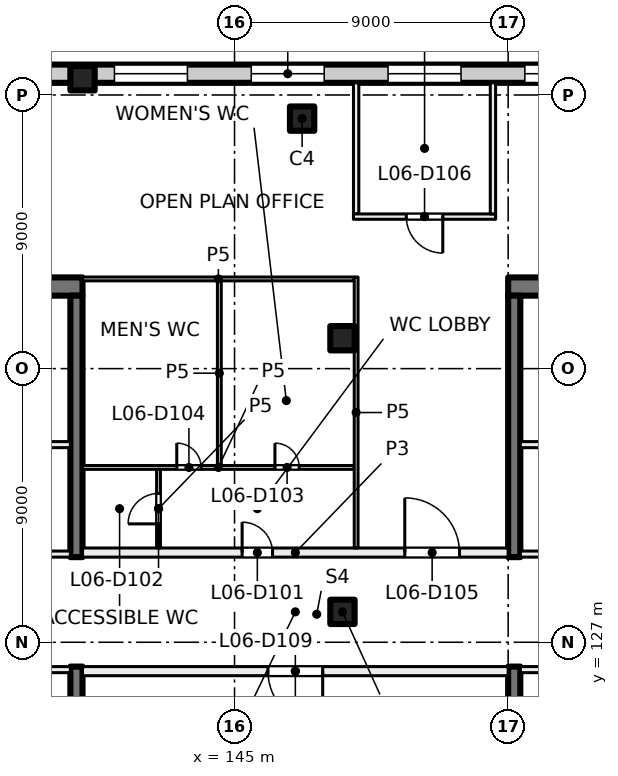
"""IFC4 building model, lengths in metres.
Left out: names, types, materials, properties, quantities, classifications, styles, units other than length and angle.
Written with IfcOpenShell. Run it as: python <this file> out.ifc"""

import sys

from ifc_helpers import new_model, si_unit, direction, frame, frame_2d, origin, origin_2d, place, context, subcontext, project, spatial, rectangle, extrude, element, fill, save


model = new_model("IFC4")
c1 = context("Model", 3, precision=1e-05, world=origin(), true_north=direction((0.0, 1.0)))
c2 = subcontext(c1, "Body", "Model", "MODEL_VIEW")
j1 = project(units=[si_unit("LENGTHUNIT", "METRE"), si_unit("PLANEANGLEUNIT", "RADIAN")], contexts=[c1])
p1 = place(None, origin())
s1 = spatial("IfcSite", under=j1, at=p1, CompositionType="ELEMENT")
p2 = place(p1, origin())
s2 = spatial("IfcBuilding", under=s1, at=p2, CompositionType="ELEMENT")
p3 = place(p2, frame((0.0, 0.0, 31.5)))
s3 = spatial("IfcBuildingStorey", under=s2, at=p3, CompositionType="ELEMENT", Elevation=31.5)
for number, where, z_axis, x_axis in (
    (1, (148.55, 128.0, 0.0), (0.0, 0.0, 1.0), (1.0, 0.0, 0.0)),
    (2, (148.55, 137.0, 0.0), (0.0, 0.0, 1.0), (1.0, 0.0, 0.0)),
    (3, (140.0, 145.55, 0.0), (0.0, 0.0, 1.0), (1.0, 0.0, 0.0)),
    (4, (147.223, 144.223, 0.0), (0.0, 0.0, 1.0), (1.0, 0.0, 0.0)),
):
    element("IfcColumn", number, at=place(p3, frame(where, z_axis=z_axis, x_axis=x_axis)), inside=s3, PredefinedType="COLUMN", context=c2, shape_type="SweptSolid", body=[
        extrude(rectangle(XDim=0.8, YDim=0.8, at=origin_2d()), origin(), (0.0, 0.0, 1.0), 4.0),
    ])
p4 = place(p3, frame((135.4, 138.7, 0.0), z_axis=(0.0, 0.0, 1.0), x_axis=(1.0, 0.0, 0.0)))
e5 = element("IfcWall", 5, at=p4, inside=s3, PredefinedType="SHEAR", context=c2, shape_type="SweptSolid", body=[
    extrude(rectangle(XDim=4.6, YDim=0.6, at=frame_2d((2.3, 0.0))), origin(), (0.0, 0.0, 1.0), 4.0),
])
for number, where, z_axis, x_axis in (
    (6, (139.8, 117.6, 0.0), (0.0, 0.0, 1.0), (0.0, 1.0, 0.0)),
    (7, (139.8, 129.8, 0.0), (0.0, 0.0, 1.0), (0.0, 1.0, 0.0)),
):
    element("IfcWall", number, at=place(p3, frame(where, z_axis=z_axis, x_axis=x_axis)), inside=s3, PredefinedType="SHEAR", context=c2, shape_type="SweptSolid", body=[
        extrude(rectangle(XDim=8.6, YDim=0.4, at=frame_2d((4.3, 0.0))), origin(), (0.0, 0.0, 1.0), 4.0),
    ])
p5 = place(p3, frame((158.6, 138.7, 0.0), z_axis=(0.0, 0.0, 1.0), x_axis=(-1.0, 0.0, 0.0)))
e8 = element("IfcWall", 8, at=p5, inside=s3, PredefinedType="SHEAR", context=c2, shape_type="SweptSolid", body=[
    extrude(rectangle(XDim=4.6, YDim=0.6, at=frame_2d((2.3, 0.0))), origin(), (0.0, 0.0, 1.0), 4.0),
])
for number, where, z_axis, x_axis in (
    (9, (154.2, 138.4, 0.0), (0.0, 0.0, 1.0), (0.0, -1.0, 0.0)),
    (10, (154.2, 126.2, 0.0), (0.0, 0.0, 1.0), (0.0, -1.0, 0.0)),
):
    element("IfcWall", number, at=place(p3, frame(where, z_axis=z_axis, x_axis=x_axis)), inside=s3, PredefinedType="SHEAR", context=c2, shape_type="SweptSolid", body=[
        extrude(rectangle(XDim=8.6, YDim=0.4, at=frame_2d((4.3, 0.0))), origin(), (0.0, 0.0, 1.0), 4.0),
    ])
p6 = place(p3, frame((131.07, 145.7, 0.0), z_axis=(0.0, 0.0, 1.0), x_axis=(1.0, 0.0, 0.0)))
e11 = element("IfcWall", 11, at=p6, inside=s3, PredefinedType="SOLIDWALL", context=c2, shape_type="SweptSolid", body=[
    extrude(rectangle(XDim=31.93, YDim=0.6, at=frame_2d((15.965, 0.0))), origin(), (0.0, 0.0, 1.0), 3.625),
])
p7 = place(p6, frame((0.98, 0.0, 0.9)))
e12 = element("IfcOpeningElement", 12, at=p7, cuts=e11, PredefinedType="OPENING", context=c2, shape_type="SweptSolid", body=[
    extrude(rectangle(XDim=2.4, YDim=2.4, at=frame_2d((1.2, 1.2))), frame((0.0, 0.31, 0.0), z_axis=(0.0, -1.0, 0.0), x_axis=(1.0, 0.0, 0.0)), (0.0, 0.0, 1.0), 0.62),
])
p8 = place(p6, frame((5.48, 0.0, 0.9)))
e13 = element("IfcOpeningElement", 13, at=p8, cuts=e11, PredefinedType="OPENING", context=c2, shape_type="SweptSolid", body=[
    extrude(rectangle(XDim=2.4, YDim=2.4, at=frame_2d((1.2, 1.2))), frame((0.0, 0.31, 0.0), z_axis=(0.0, -1.0, 0.0), x_axis=(1.0, 0.0, 0.0)), (0.0, 0.0, 1.0), 0.62),
])
p9 = place(p6, frame((9.98, 0.0, 0.9)))
e14 = element("IfcOpeningElement", 14, at=p9, cuts=e11, PredefinedType="OPENING", context=c2, shape_type="SweptSolid", body=[
    extrude(rectangle(XDim=2.4, YDim=2.4, at=frame_2d((1.2, 1.2))), frame((0.0, 0.31, 0.0), z_axis=(0.0, -1.0, 0.0), x_axis=(1.0, 0.0, 0.0)), (0.0, 0.0, 1.0), 0.62),
])
p10 = place(p6, frame((14.48, 0.0, 0.9)))
e15 = element("IfcOpeningElement", 15, at=p10, cuts=e11, PredefinedType="OPENING", context=c2, shape_type="SweptSolid", body=[
    extrude(rectangle(XDim=2.4, YDim=2.4, at=frame_2d((1.2, 1.2))), frame((0.0, 0.31, 0.0), z_axis=(0.0, -1.0, 0.0), x_axis=(1.0, 0.0, 0.0)), (0.0, 0.0, 1.0), 0.62),
])
p11 = place(p6, frame((18.98, 0.0, 0.9)))
e16 = element("IfcOpeningElement", 16, at=p11, cuts=e11, PredefinedType="OPENING", context=c2, shape_type="SweptSolid", body=[
    extrude(rectangle(XDim=2.4, YDim=2.4, at=frame_2d((1.2, 1.2))), frame((0.0, 0.31, 0.0), z_axis=(0.0, -1.0, 0.0), x_axis=(1.0, 0.0, 0.0)), (0.0, 0.0, 1.0), 0.62),
])
p12 = place(p6, frame((23.48, 0.0, 0.9)))
e17 = element("IfcOpeningElement", 17, at=p12, cuts=e11, PredefinedType="OPENING", context=c2, shape_type="SweptSolid", body=[
    extrude(rectangle(XDim=2.4, YDim=2.4, at=frame_2d((1.2, 1.2))), frame((0.0, 0.31, 0.0), z_axis=(0.0, -1.0, 0.0), x_axis=(1.0, 0.0, 0.0)), (0.0, 0.0, 1.0), 0.62),
])
p13 = place(p6, frame((27.98, 0.0, 0.9)))
e18 = element("IfcOpeningElement", 18, at=p13, cuts=e11, PredefinedType="OPENING", context=c2, shape_type="SweptSolid", body=[
    extrude(rectangle(XDim=2.4, YDim=2.4, at=frame_2d((1.2, 1.2))), frame((0.0, 0.31, 0.0), z_axis=(0.0, -1.0, 0.0), x_axis=(1.0, 0.0, 0.0)), (0.0, 0.0, 1.0), 0.62),
])
p14 = place(p3, frame((135.0, 129.9, 0.0), z_axis=(0.0, 0.0, 1.0), x_axis=(1.0, 0.0, 0.0)))
e19 = element("IfcWall", 19, at=p14, inside=s3, PredefinedType="PARTITIONING", context=c2, shape_type="SweptSolid", body=[
    extrude(rectangle(XDim=4.6, YDim=0.2, at=frame_2d((2.3, 0.0))), origin(), (0.0, 0.0, 1.0), 3.625),
])
p15 = place(p14, frame((1.7, 0.0, 0.0)))
e20 = element("IfcOpeningElement", 20, at=p15, cuts=e19, PredefinedType="OPENING", context=c2, shape_type="SweptSolid", body=[
    extrude(rectangle(XDim=1.2, YDim=2.1, at=frame_2d((0.6, 1.05))), frame((0.0, 0.11, 0.0), z_axis=(0.0, -1.0, 0.0), x_axis=(1.0, 0.0, 0.0)), (0.0, 0.0, 1.0), 0.22),
])
p16 = place(p3, frame((135.0, 133.5, 0.0), z_axis=(0.0, 0.0, 1.0), x_axis=(1.0, 0.0, 0.0)))
e21 = element("IfcWall", 21, at=p16, inside=s3, PredefinedType="PARTITIONING", context=c2, shape_type="SweptSolid", body=[
    extrude(rectangle(XDim=4.6, YDim=0.2, at=frame_2d((2.3, 0.0))), origin(), (0.0, 0.0, 1.0), 3.625),
])
p17 = place(p16, frame((1.75, 0.0, 0.0)))
e22 = element("IfcOpeningElement", 22, at=p17, cuts=e21, PredefinedType="OPENING", context=c2, shape_type="SweptSolid", body=[
    extrude(rectangle(XDim=1.5, YDim=2.1, at=frame_2d((0.75, 1.05))), frame((0.0, 0.11, 0.0), z_axis=(0.0, -1.0, 0.0), x_axis=(1.0, 0.0, 0.0)), (0.0, 0.0, 1.0), 0.22),
])
p18 = place(p3, frame((139.6, 126.1, 0.0), z_axis=(0.0, 0.0, 1.0), x_axis=(-1.0, 0.0, 0.0)))
e23 = element("IfcWall", 23, at=p18, inside=s3, PredefinedType="PARTITIONING", context=c2, shape_type="SweptSolid", body=[
    extrude(rectangle(XDim=4.6, YDim=0.2, at=frame_2d((2.3, 0.0))), origin(), (0.0, 0.0, 1.0), 3.625),
])
p19 = place(p18, frame((1.7, 0.0, 0.0)))
e24 = element("IfcOpeningElement", 24, at=p19, cuts=e23, PredefinedType="OPENING", context=c2, shape_type="SweptSolid", body=[
    extrude(rectangle(XDim=1.2, YDim=2.1, at=frame_2d((0.6, 1.05))), frame((0.0, 0.11, 0.0), z_axis=(0.0, -1.0, 0.0), x_axis=(1.0, 0.0, 0.0)), (0.0, 0.0, 1.0), 0.22),
])
p20 = place(p3, frame((163.8, 126.1, 0.0), z_axis=(0.0, 0.0, 1.0), x_axis=(-1.0, 0.0, 0.0)))
e25 = element("IfcWall", 25, at=p20, inside=s3, PredefinedType="PARTITIONING", context=c2, shape_type="SweptSolid", body=[
    extrude(rectangle(XDim=9.4, YDim=0.2, at=frame_2d((4.7, 0.0))), origin(), (0.0, 0.0, 1.0), 3.625),
])
p21 = place(p20, frame((4.1, 0.0, 0.0)))
e26 = element("IfcOpeningElement", 26, at=p21, cuts=e25, PredefinedType="OPENING", context=c2, shape_type="SweptSolid", body=[
    extrude(rectangle(XDim=1.2, YDim=2.1, at=frame_2d((0.6, 1.05))), frame((0.0, 0.11, 0.0), z_axis=(0.0, -1.0, 0.0), x_axis=(1.0, 0.0, 0.0)), (0.0, 0.0, 1.0), 0.22),
])
p22 = place(p3, frame((154.4, 129.9, 0.0), z_axis=(0.0, 0.0, 1.0), x_axis=(1.0, 0.0, 0.0)))
e27 = element("IfcWall", 27, at=p22, inside=s3, PredefinedType="PARTITIONING", context=c2, shape_type="SweptSolid", body=[
    extrude(rectangle(XDim=9.4, YDim=0.2, at=frame_2d((4.7, 0.0))), origin(), (0.0, 0.0, 1.0), 3.625),
])
p23 = place(p22, frame((4.1, 0.0, 0.0)))
e28 = element("IfcOpeningElement", 28, at=p23, cuts=e27, PredefinedType="OPENING", context=c2, shape_type="SweptSolid", body=[
    extrude(rectangle(XDim=1.2, YDim=2.1, at=frame_2d((0.6, 1.05))), frame((0.0, 0.11, 0.0), z_axis=(0.0, -1.0, 0.0), x_axis=(1.0, 0.0, 0.0)), (0.0, 0.0, 1.0), 0.22),
])
p24 = place(p3, frame((154.4, 133.5, 0.0), z_axis=(0.0, 0.0, 1.0), x_axis=(1.0, 0.0, 0.0)))
e29 = element("IfcWall", 29, at=p24, inside=s3, PredefinedType="PARTITIONING", context=c2, shape_type="SweptSolid", body=[
    extrude(rectangle(XDim=9.4, YDim=0.2, at=frame_2d((4.7, 0.0))), origin(), (0.0, 0.0, 1.0), 3.625),
])
p25 = place(p24, frame((1.35, 0.0, 0.0)))
e30 = element("IfcOpeningElement", 30, at=p25, cuts=e29, PredefinedType="OPENING", context=c2, shape_type="SweptSolid", body=[
    extrude(rectangle(XDim=1.5, YDim=2.1, at=frame_2d((0.75, 1.05))), frame((0.0, 0.11, 0.0), z_axis=(0.0, -1.0, 0.0), x_axis=(1.0, 0.0, 0.0)), (0.0, 0.0, 1.0), 0.22),
])
p26 = place(p3, frame((140.0, 129.95, 0.0), z_axis=(0.0, 0.0, 1.0), x_axis=(1.0, 0.0, 0.0)))
e31 = element("IfcWall", 31, at=p26, inside=s3, PredefinedType="PARTITIONING", context=c2, shape_type="SweptSolid", body=[
    extrude(rectangle(XDim=14.0, YDim=0.3, at=frame_2d((7.0, 0.0))), origin(), (0.0, 0.0, 1.0), 3.625),
])
p27 = place(p26, frame((5.25, 0.0, 0.0)))
e32 = element("IfcOpeningElement", 32, at=p27, cuts=e31, PredefinedType="OPENING", context=c2, shape_type="SweptSolid", body=[
    extrude(rectangle(XDim=1.0, YDim=2.1, at=frame_2d((0.5, 1.05))), frame((0.0, 0.16, 0.0), z_axis=(0.0, -1.0, 0.0), x_axis=(1.0, 0.0, 0.0)), (0.0, 0.0, 1.0), 0.32),
])
p28 = place(p26, frame((10.6, 0.0, 0.0)))
e33 = element("IfcOpeningElement", 33, at=p28, cuts=e31, PredefinedType="OPENING", context=c2, shape_type="SweptSolid", body=[
    extrude(rectangle(XDim=1.8, YDim=2.1, at=frame_2d((0.9, 1.05))), frame((0.0, 0.16, 0.0), z_axis=(0.0, -1.0, 0.0), x_axis=(1.0, 0.0, 0.0)), (0.0, 0.0, 1.0), 0.32),
])
p29 = place(p3, frame((140.0, 132.75, 0.0), z_axis=(0.0, 0.0, 1.0), x_axis=(1.0, 0.0, 0.0)))
e34 = element("IfcWall", 34, at=p29, inside=s3, PredefinedType="PARTITIONING", context=c2, shape_type="SweptSolid", body=[
    extrude(rectangle(XDim=8.938, YDim=0.125, at=frame_2d((4.469, 0.0))), origin(), (0.0, 0.0, 1.0), 3.625),
])
p30 = place(p29, frame((6.329, 0.0, 0.0)))
e35 = element("IfcOpeningElement", 35, at=p30, cuts=e34, PredefinedType="OPENING", context=c2, shape_type="SweptSolid", body=[
    extrude(rectangle(XDim=0.8, YDim=2.1, at=frame_2d((0.4, 1.05))), frame((0.0, 0.073, 0.0), z_axis=(0.0, -1.0, 0.0), x_axis=(1.0, 0.0, 0.0)), (0.0, 0.0, 1.0), 0.145),
])
p31 = place(p29, frame((3.1, 0.0, 0.0)))
e36 = element("IfcOpeningElement", 36, at=p31, cuts=e34, PredefinedType="OPENING", context=c2, shape_type="SweptSolid", body=[
    extrude(rectangle(XDim=0.8, YDim=2.1, at=frame_2d((0.4, 1.05))), frame((0.0, 0.073, 0.0), z_axis=(0.0, -1.0, 0.0), x_axis=(1.0, 0.0, 0.0)), (0.0, 0.0, 1.0), 0.145),
])
p32 = place(p3, frame((140.0, 138.95, 0.0), z_axis=(0.0, 0.0, 1.0), x_axis=(1.0, 0.0, 0.0)))
e37 = element("IfcWall", 37, at=p32, inside=s3, PredefinedType="PARTITIONING", context=c2, shape_type="SweptSolid", body=[
    extrude(rectangle(XDim=8.938, YDim=0.125, at=frame_2d((4.469, 0.0))), origin(), (0.0, 0.0, 1.0), 3.625),
])
p33 = place(p3, frame((142.5, 130.1, 0.0), z_axis=(0.0, 0.0, 1.0), x_axis=(0.0, 1.0, 0.0)))
e38 = element("IfcWall", 38, at=p33, inside=s3, PredefinedType="PARTITIONING", context=c2, shape_type="SweptSolid", body=[
    extrude(rectangle(XDim=2.588, YDim=0.125, at=frame_2d((1.294, 0.0))), origin(), (0.0, 0.0, 1.0), 3.625),
])
p34 = place(p33, frame((0.794, 0.0, 0.0)))
e39 = element("IfcOpeningElement", 39, at=p34, cuts=e38, PredefinedType="OPENING", context=c2, shape_type="SweptSolid", body=[
    extrude(rectangle(XDim=1.0, YDim=2.1, at=frame_2d((0.5, 1.05))), frame((0.0, 0.073, 0.0), z_axis=(0.0, -1.0, 0.0), x_axis=(1.0, 0.0, 0.0)), (0.0, 0.0, 1.0), 0.145),
])
p35 = place(p3, frame((144.5, 138.888, 0.0), z_axis=(0.0, 0.0, 1.0), x_axis=(0.0, -1.0, 0.0)))
e40 = element("IfcWall", 40, at=p35, inside=s3, PredefinedType="PARTITIONING", context=c2, shape_type="SweptSolid", body=[
    extrude(rectangle(XDim=6.076, YDim=0.125, at=frame_2d((3.038, 0.0))), origin(), (0.0, 0.0, 1.0), 3.625),
])
p36 = place(p3, frame((149.0, 139.012, 0.0), z_axis=(0.0, 0.0, 1.0), x_axis=(0.0, -1.0, 0.0)))
e41 = element("IfcWall", 41, at=p36, inside=s3, PredefinedType="PARTITIONING", context=c2, shape_type="SweptSolid", body=[
    extrude(rectangle(XDim=8.912, YDim=0.125, at=frame_2d((4.456, 0.0))), origin(), (0.0, 0.0, 1.0), 3.625),
])
p37 = place(p3, frame((149.0, 141.088, 0.0), z_axis=(0.0, 0.0, 1.0), x_axis=(0.0, 1.0, 0.0)))
e42 = element("IfcWall", 42, at=p37, inside=s3, PredefinedType="PARTITIONING", context=c2, shape_type="SweptSolid", body=[
    extrude(rectangle(XDim=4.312, YDim=0.175, at=frame_2d((2.156, 0.0))), origin(), (0.0, 0.0, 1.0), 3.625),
])
p38 = place(p3, frame((153.588, 141.0, 0.0), z_axis=(0.0, 0.0, 1.0), x_axis=(-1.0, 0.0, 0.0)))
e43 = element("IfcWall", 43, at=p38, inside=s3, PredefinedType="PARTITIONING", context=c2, shape_type="SweptSolid", body=[
    extrude(rectangle(XDim=4.676, YDim=0.175, at=frame_2d((2.338, 0.0))), origin(), (0.0, 0.0, 1.0), 3.625),
])
p39 = place(p38, frame((1.738, 0.0, 0.0)))
e44 = element("IfcOpeningElement", 44, at=p39, cuts=e43, PredefinedType="OPENING", context=c2, shape_type="SweptSolid", body=[
    extrude(rectangle(XDim=1.2, YDim=2.1, at=frame_2d((0.6, 1.05))), frame((0.0, 0.097, 0.0), z_axis=(0.0, -1.0, 0.0), x_axis=(1.0, 0.0, 0.0)), (0.0, 0.0, 1.0), 0.195),
])
p40 = place(p3, frame((153.5, 145.4, 0.0), z_axis=(0.0, 0.0, 1.0), x_axis=(0.0, -1.0, 0.0)))
e45 = element("IfcWall", 45, at=p40, inside=s3, PredefinedType="PARTITIONING", context=c2, shape_type="SweptSolid", body=[
    extrude(rectangle(XDim=4.312, YDim=0.175, at=frame_2d((2.156, 0.0))), origin(), (0.0, 0.0, 1.0), 3.625),
])
p41 = place(p3, frame((154.0, 126.05, 0.0), z_axis=(0.0, 0.0, 1.0), x_axis=(-1.0, 0.0, 0.0)))
e46 = element("IfcWall", 46, at=p41, inside=s3, PredefinedType="PARTITIONING", context=c2, shape_type="SweptSolid", body=[
    extrude(rectangle(XDim=14.0, YDim=0.3, at=frame_2d((7.0, 0.0))), origin(), (0.0, 0.0, 1.0), 3.625),
])
p42 = place(p41, frame((6.1, 0.0, 0.0)))
e47 = element("IfcOpeningElement", 47, at=p42, cuts=e46, PredefinedType="OPENING", context=c2, shape_type="SweptSolid", body=[
    extrude(rectangle(XDim=1.8, YDim=2.1, at=frame_2d((0.9, 1.05))), frame((0.0, 0.16, 0.0), z_axis=(0.0, -1.0, 0.0), x_axis=(1.0, 0.0, 0.0)), (0.0, 0.0, 1.0), 0.32),
])
p43 = place(p9, origin())
e48 = element("IfcWindow", 48, at=p43, inside=s3, PartitioningType="SINGLE_PANEL", PredefinedType="WINDOW", context=c2, shape_type="SweptSolid", body=[
    extrude(rectangle(XDim=2.4, YDim=2.4, at=frame_2d((1.2, 1.2))), frame((0.0, 0.03, 0.0), z_axis=(0.0, -1.0, 0.0), x_axis=(1.0, 0.0, 0.0)), (0.0, 0.0, 1.0), 0.06),
])
fill(e14, e48)
p44 = place(p10, origin())
e49 = element("IfcWindow", 49, at=p44, inside=s3, PartitioningType="SINGLE_PANEL", PredefinedType="WINDOW", context=c2, shape_type="SweptSolid", body=[
    extrude(rectangle(XDim=2.4, YDim=2.4, at=frame_2d((1.2, 1.2))), frame((0.0, 0.03, 0.0), z_axis=(0.0, -1.0, 0.0), x_axis=(1.0, 0.0, 0.0)), (0.0, 0.0, 1.0), 0.06),
])
fill(e15, e49)
p45 = place(p11, origin())
e50 = element("IfcWindow", 50, at=p45, inside=s3, PartitioningType="SINGLE_PANEL", PredefinedType="WINDOW", context=c2, shape_type="SweptSolid", body=[
    extrude(rectangle(XDim=2.4, YDim=2.4, at=frame_2d((1.2, 1.2))), frame((0.0, 0.03, 0.0), z_axis=(0.0, -1.0, 0.0), x_axis=(1.0, 0.0, 0.0)), (0.0, 0.0, 1.0), 0.06),
])
fill(e16, e50)
p46 = place(p12, origin())
e51 = element("IfcWindow", 51, at=p46, inside=s3, PartitioningType="SINGLE_PANEL", PredefinedType="WINDOW", context=c2, shape_type="SweptSolid", body=[
    extrude(rectangle(XDim=2.4, YDim=2.4, at=frame_2d((1.2, 1.2))), frame((0.0, 0.03, 0.0), z_axis=(0.0, -1.0, 0.0), x_axis=(1.0, 0.0, 0.0)), (0.0, 0.0, 1.0), 0.06),
])
fill(e17, e51)
p47 = place(p27, origin())
e52 = element("IfcDoor", 52, at=p47, inside=s3, OperationType="SINGLE_SWING_RIGHT", PredefinedType="DOOR", context=c2, shape_type="SweptSolid", body=[
    extrude(rectangle(XDim=1.0, YDim=2.1, at=frame_2d((0.5, 1.05))), frame((0.0, 0.025, 0.0), z_axis=(0.0, -1.0, 0.0), x_axis=(1.0, 0.0, 0.0)), (0.0, 0.0, 1.0), 0.05),
])
fill(e32, e52)
p48 = place(p34, origin())
e53 = element("IfcDoor", 53, at=p48, inside=s3, OperationType="SINGLE_SWING_RIGHT", PredefinedType="DOOR", context=c2, shape_type="SweptSolid", body=[
    extrude(rectangle(XDim=1.0, YDim=2.1, at=frame_2d((0.5, 1.05))), frame((0.0, 0.025, 0.0), z_axis=(0.0, -1.0, 0.0), x_axis=(1.0, 0.0, 0.0)), (0.0, 0.0, 1.0), 0.05),
])
fill(e39, e53)
p49 = place(p30, origin())
e54 = element("IfcDoor", 54, at=p49, inside=s3, OperationType="SINGLE_SWING_RIGHT", PredefinedType="DOOR", context=c2, shape_type="SweptSolid", body=[
    extrude(rectangle(XDim=0.8, YDim=2.1, at=frame_2d((0.4, 1.05))), frame((0.0, 0.025, 0.0), z_axis=(0.0, -1.0, 0.0), x_axis=(1.0, 0.0, 0.0)), (0.0, 0.0, 1.0), 0.05),
])
fill(e35, e54)
p50 = place(p31, origin())
e55 = element("IfcDoor", 55, at=p50, inside=s3, OperationType="SINGLE_SWING_LEFT", PredefinedType="DOOR", context=c2, shape_type="SweptSolid", body=[
    extrude(rectangle(XDim=0.8, YDim=2.1, at=frame_2d((0.4, 1.05))), frame((0.0, 0.025, 0.0), z_axis=(0.0, -1.0, 0.0), x_axis=(1.0, 0.0, 0.0)), (0.0, 0.0, 1.0), 0.05),
])
fill(e36, e55)
p51 = place(p28, origin())
e56 = element("IfcDoor", 56, at=p51, inside=s3, OperationType="DOUBLE_DOOR_SINGLE_SWING", PredefinedType="DOOR", context=c2, shape_type="SweptSolid", body=[
    extrude(rectangle(XDim=1.8, YDim=2.1, at=frame_2d((0.9, 1.05))), frame((0.0, 0.025, 0.0), z_axis=(0.0, -1.0, 0.0), x_axis=(1.0, 0.0, 0.0)), (0.0, 0.0, 1.0), 0.05),
])
fill(e33, e56)
p52 = place(p39, origin())
e57 = element("IfcDoor", 57, at=p52, inside=s3, OperationType="DOUBLE_DOOR_SINGLE_SWING", PredefinedType="DOOR", context=c2, shape_type="SweptSolid", body=[
    extrude(rectangle(XDim=1.2, YDim=2.1, at=frame_2d((0.6, 1.05))), frame((0.0, 0.025, 0.0), z_axis=(0.0, -1.0, 0.0), x_axis=(1.0, 0.0, 0.0)), (0.0, 0.0, 1.0), 0.05),
])
fill(e44, e57)
p53 = place(p42, origin())
e58 = element("IfcDoor", 58, at=p53, inside=s3, OperationType="DOUBLE_DOOR_SINGLE_SWING", PredefinedType="DOOR", context=c2, shape_type="SweptSolid", body=[
    extrude(rectangle(XDim=1.8, YDim=2.1, at=frame_2d((0.9, 1.05))), frame((0.0, 0.025, 0.0), z_axis=(0.0, -1.0, 0.0), x_axis=(1.0, 0.0, 0.0)), (0.0, 0.0, 1.0), 0.05),
])
fill(e47, e58)
save(model, sys.argv[1])
